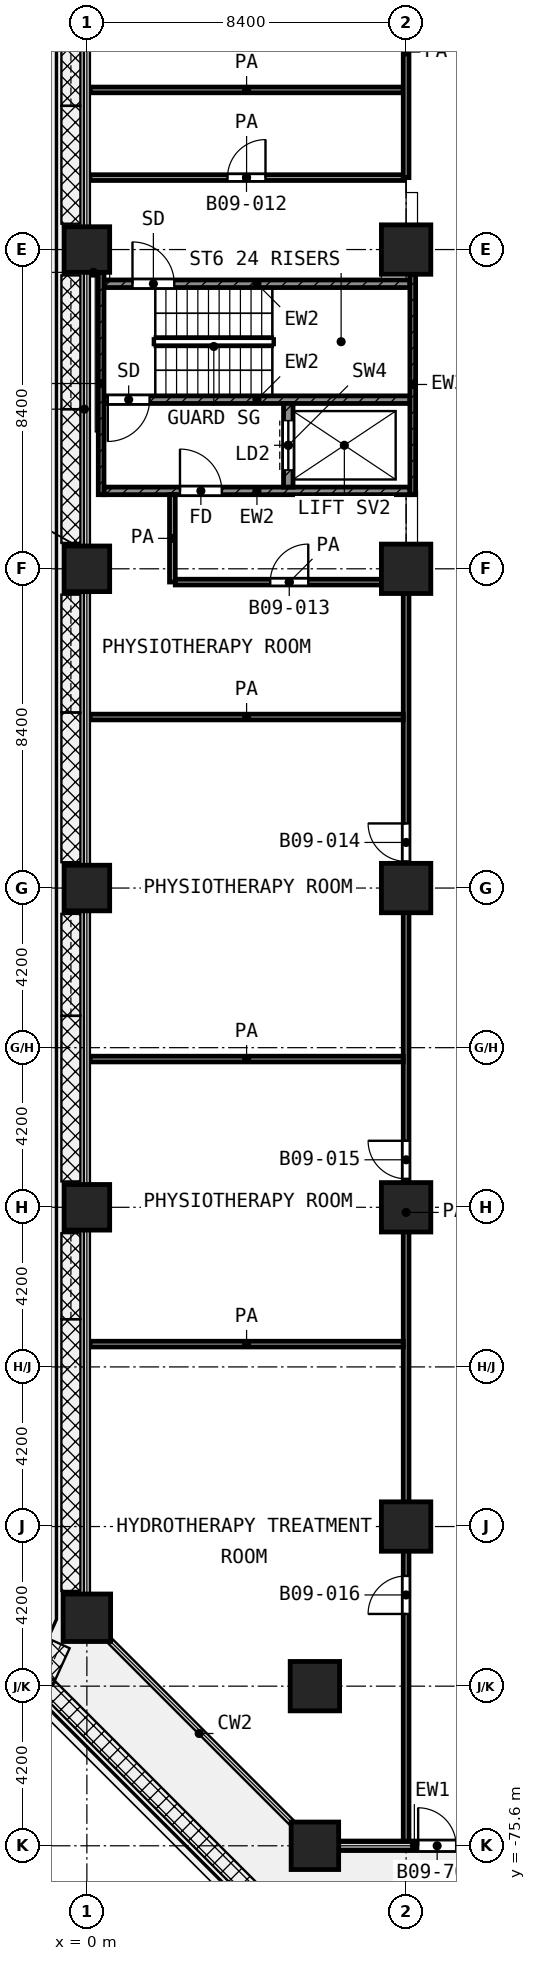
"""IFC4 building model, lengths in metres.
Left out: names, types, materials, properties, quantities, classifications, styles, units other than length and angle.
Written with IfcOpenShell. Run it as: python <this file> out.ifc"""

import sys

from ifc_helpers import new_model, si_unit, direction, frame, frame_2d, origin, origin_2d, place, context, subcontext, project, spatial, rectangle, extrude, element, fill, save


model = new_model("IFC4")
c1 = context("Model", 3, precision=1e-05, world=origin(), true_north=direction((0.0, 1.0)))
c2 = subcontext(c1, "Body", "Model", "MODEL_VIEW")
j1 = project(units=[si_unit("LENGTHUNIT", "METRE"), si_unit("PLANEANGLEUNIT", "RADIAN")], contexts=[c1])
p1 = place(None, origin())
s1 = spatial("IfcSite", under=j1, at=p1, CompositionType="ELEMENT")
p2 = place(p1, origin())
s2 = spatial("IfcBuilding", under=s1, at=p2, CompositionType="ELEMENT")
p3 = place(p2, frame((0.0, 0.0, 43.4)))
s3 = spatial("IfcBuildingStorey", under=s2, at=p3, CompositionType="ELEMENT", Elevation=43.4)
p4 = place(p3, frame((0.0, -33.6, 0.0), z_axis=(0.0, 0.0, 1.0), x_axis=(1.0, 0.0, 0.0)))
e1 = element("IfcColumn", 1, at=p4, inside=s3, PredefinedType="COLUMN", context=c2, shape_type="SweptSolid", body=[
    extrude(rectangle(XDim=1.2, YDim=1.2, at=origin_2d()), origin(), (0.0, 0.0, 1.0), 4.2),
])
p5 = place(p3, frame((8.4, -33.6, 0.0), z_axis=(0.0, 0.0, 1.0), x_axis=(1.0, 0.0, 0.0)))
e2 = element("IfcColumn", 2, at=p5, inside=s3, PredefinedType="COLUMN", context=c2, shape_type="SweptSolid", body=[
    extrude(rectangle(XDim=1.3, YDim=1.3, at=origin_2d()), origin(), (0.0, 0.0, 1.0), 4.2),
])
p6 = place(p3, frame((0.0, -42.0, 0.0), z_axis=(0.0, 0.0, 1.0), x_axis=(1.0, 0.0, 0.0)))
e3 = element("IfcColumn", 3, at=p6, inside=s3, PredefinedType="COLUMN", context=c2, shape_type="SweptSolid", body=[
    extrude(rectangle(XDim=1.2, YDim=1.2, at=origin_2d()), origin(), (0.0, 0.0, 1.0), 4.2),
])
p7 = place(p3, frame((8.4, -42.0, 0.0), z_axis=(0.0, 0.0, 1.0), x_axis=(1.0, 0.0, 0.0)))
e4 = element("IfcColumn", 4, at=p7, inside=s3, PredefinedType="COLUMN", context=c2, shape_type="SweptSolid", body=[
    extrude(rectangle(XDim=1.3, YDim=1.3, at=origin_2d()), origin(), (0.0, 0.0, 1.0), 4.2),
])
p8 = place(p3, frame((0.0, -50.4, 0.0), z_axis=(0.0, 0.0, 1.0), x_axis=(1.0, 0.0, 0.0)))
e5 = element("IfcColumn", 5, at=p8, inside=s3, PredefinedType="COLUMN", context=c2, shape_type="SweptSolid", body=[
    extrude(rectangle(XDim=1.2, YDim=1.2, at=origin_2d()), origin(), (0.0, 0.0, 1.0), 4.2),
])
p9 = place(p3, frame((8.4, -50.4, 0.0), z_axis=(0.0, 0.0, 1.0), x_axis=(1.0, 0.0, 0.0)))
e6 = element("IfcColumn", 6, at=p9, inside=s3, PredefinedType="COLUMN", context=c2, shape_type="SweptSolid", body=[
    extrude(rectangle(XDim=1.3, YDim=1.3, at=origin_2d()), origin(), (0.0, 0.0, 1.0), 4.2),
])
p10 = place(p3, frame((0.0, -58.8, 0.0), z_axis=(0.0, 0.0, 1.0), x_axis=(1.0, 0.0, 0.0)))
e7 = element("IfcColumn", 7, at=p10, inside=s3, PredefinedType="COLUMN", context=c2, shape_type="SweptSolid", body=[
    extrude(rectangle(XDim=1.2, YDim=1.2, at=origin_2d()), origin(), (0.0, 0.0, 1.0), 4.2),
])
for number, where, z_axis, x_axis in (
    (8, (8.4, -58.8, 0.0), (0.0, 0.0, 1.0), (1.0, 0.0, 0.0)),
    (9, (8.4, -67.2, 0.0), (0.0, 0.0, 1.0), (1.0, 0.0, 0.0)),
):
    element("IfcColumn", number, at=place(p3, frame(where, z_axis=z_axis, x_axis=x_axis)), inside=s3, PredefinedType="COLUMN", context=c2, shape_type="SweptSolid", body=[
        extrude(rectangle(XDim=1.3, YDim=1.3, at=origin_2d()), origin(), (0.0, 0.0, 1.0), 4.2),
    ])
p11 = place(p3, frame((0.0, -69.6, 0.0), z_axis=(0.0, 0.0, 1.0), x_axis=(1.0, 0.0, 0.0)))
e10 = element("IfcColumn", 10, at=p11, inside=s3, PredefinedType="COLUMN", context=c2, shape_type="SweptSolid", body=[
    extrude(rectangle(XDim=1.25, YDim=1.25, at=origin_2d()), origin(), (0.0, 0.0, 1.0), 4.2),
])
p12 = place(p3, frame((6.0, -71.4, 0.0), z_axis=(0.0, 0.0, 1.0), x_axis=(1.0, 0.0, 0.0)))
e11 = element("IfcColumn", 11, at=p12, inside=s3, PredefinedType="COLUMN", context=c2, shape_type="SweptSolid", body=[
    extrude(rectangle(XDim=1.3, YDim=1.3, at=origin_2d()), origin(), (0.0, 0.0, 1.0), 4.2),
])
p13 = place(p3, frame((6.0, -75.6, 0.0), z_axis=(0.0, 0.0, 1.0), x_axis=(1.0, 0.0, 0.0)))
e12 = element("IfcColumn", 12, at=p13, inside=s3, PredefinedType="COLUMN", context=c2, shape_type="SweptSolid", body=[
    extrude(rectangle(XDim=1.25, YDim=1.25, at=origin_2d()), origin(), (0.0, 0.0, 1.0), 4.2),
])
p14 = place(p3, frame((6.625, -75.6, 0.0), z_axis=(0.0, 0.0, 1.0), x_axis=(1.0, 0.0, 0.0)))
e13 = element("IfcWall", 13, at=p14, inside=s3, PredefinedType="SOLIDWALL", context=c2, shape_type="SweptSolid", body=[
    extrude(rectangle(XDim=3.983, YDim=0.25, at=frame_2d((1.992, 0.0))), origin(), (0.0, 0.0, 1.0), 3.78),
])
p15 = place(p14, frame((2.092, 0.0, 0.0)))
e14 = element("IfcOpeningElement", 14, at=p15, cuts=e13, PredefinedType="OPENING", context=c2, shape_type="SweptSolid", body=[
    extrude(rectangle(XDim=1.0, YDim=2.1, at=frame_2d((0.5, 1.05))), frame((0.0, 0.135, 0.0), z_axis=(0.0, -1.0, 0.0), x_axis=(1.0, 0.0, 0.0)), (0.0, 0.0, 1.0), 0.27),
])
p16 = place(p3, frame((0.375, -40.05, 0.0), z_axis=(0.0, 0.0, 1.0), x_axis=(0.0, 1.0, 0.0)))
e15 = element("IfcWall", 15, at=p16, inside=s3, PredefinedType="SHEAR", context=c2, shape_type="SweptSolid", body=[
    extrude(rectangle(XDim=5.85, YDim=0.15, at=frame_2d((2.925, 0.0))), origin(), (0.0, 0.0, 1.0), 3.9),
])
p17 = place(p3, frame((8.575, -40.05, 0.0), z_axis=(0.0, 0.0, 1.0), x_axis=(0.0, 1.0, 0.0)))
e16 = element("IfcWall", 16, at=p17, inside=s3, PredefinedType="SHEAR", context=c2, shape_type="SweptSolid", body=[
    extrude(rectangle(XDim=5.8, YDim=0.15, at=frame_2d((2.9, 0.0))), origin(), (0.0, 0.0, 1.0), 3.9),
])
p18 = place(p3, frame((0.45, -34.5, 0.0), z_axis=(0.0, 0.0, 1.0), x_axis=(1.0, 0.0, 0.0)))
e17 = element("IfcWall", 17, at=p18, inside=s3, PredefinedType="SHEAR", context=c2, shape_type="SweptSolid", body=[
    extrude(rectangle(XDim=8.05, YDim=0.2, at=frame_2d((4.025, 0.0))), origin(), (0.0, 0.0, 1.0), 3.9),
])
p19 = place(p18, frame((0.75, 0.0, 0.0)))
e18 = element("IfcOpeningElement", 18, at=p19, cuts=e17, PredefinedType="OPENING", context=c2, shape_type="SweptSolid", body=[
    extrude(rectangle(XDim=1.1, YDim=2.1, at=frame_2d((0.55, 1.05))), frame((0.0, 0.11, 0.0), z_axis=(0.0, -1.0, 0.0), x_axis=(1.0, 0.0, 0.0)), (0.0, 0.0, 1.0), 0.22),
])
p20 = place(p3, frame((0.45, -37.55, 0.0), z_axis=(0.0, 0.0, 1.0), x_axis=(1.0, 0.0, 0.0)))
e19 = element("IfcWall", 19, at=p20, inside=s3, PredefinedType="SHEAR", context=c2, shape_type="SweptSolid", body=[
    extrude(rectangle(XDim=8.05, YDim=0.2, at=frame_2d((4.025, 0.0))), origin(), (0.0, 0.0, 1.0), 3.9),
])
p21 = place(p20, frame((0.1, 0.0, 0.0)))
e20 = element("IfcOpeningElement", 20, at=p21, cuts=e19, PredefinedType="OPENING", context=c2, shape_type="SweptSolid", body=[
    extrude(rectangle(XDim=1.1, YDim=2.1, at=frame_2d((0.55, 1.05))), frame((0.0, 0.11, 0.0), z_axis=(0.0, -1.0, 0.0), x_axis=(1.0, 0.0, 0.0)), (0.0, 0.0, 1.0), 0.22),
])
p22 = place(p3, frame((0.45, -39.95, 0.0), z_axis=(0.0, 0.0, 1.0), x_axis=(1.0, 0.0, 0.0)))
e21 = element("IfcWall", 21, at=p22, inside=s3, PredefinedType="SHEAR", context=c2, shape_type="SweptSolid", body=[
    extrude(rectangle(XDim=8.05, YDim=0.2, at=frame_2d((4.025, 0.0))), origin(), (0.0, 0.0, 1.0), 3.9),
])
p23 = place(p22, frame((2.0, 0.0, 0.0)))
e22 = element("IfcOpeningElement", 22, at=p23, cuts=e21, PredefinedType="OPENING", context=c2, shape_type="SweptSolid", body=[
    extrude(rectangle(XDim=1.1, YDim=2.1, at=frame_2d((0.55, 1.05))), frame((0.0, 0.11, 0.0), z_axis=(0.0, -1.0, 0.0), x_axis=(1.0, 0.0, 0.0)), (0.0, 0.0, 1.0), 0.22),
])
p24 = place(p3, frame((5.3, -39.85, 0.0), z_axis=(0.0, 0.0, 1.0), x_axis=(0.0, 1.0, 0.0)))
e23 = element("IfcWall", 23, at=p24, inside=s3, PredefinedType="SHEAR", context=c2, shape_type="SweptSolid", body=[
    extrude(rectangle(XDim=2.2, YDim=0.25, at=frame_2d((1.1, 0.0))), origin(), (0.0, 0.0, 1.0), 3.9),
])
p25 = place(p24, frame((0.45, 0.0, 0.0)))
e24 = element("IfcOpeningElement", 24, at=p25, cuts=e23, PredefinedType="OPENING", context=c2, shape_type="SweptSolid", body=[
    extrude(rectangle(XDim=1.3, YDim=2.1, at=frame_2d((0.65, 1.05))), frame((0.0, 0.135, 0.0), z_axis=(0.0, -1.0, 0.0), x_axis=(1.0, 0.0, 0.0)), (0.0, 0.0, 1.0), 0.27),
])
for number, where, z_axis, x_axis in (
    (25, (0.08, -62.4, 0.0), (0.0, 0.0, 1.0), (1.0, 0.0, 0.0)),
    (26, (0.08, -54.9, 0.0), (0.0, 0.0, 1.0), (1.0, 0.0, 0.0)),
    (27, (0.08, -45.9, 0.0), (0.0, 0.0, 1.0), (1.0, 0.0, 0.0)),
):
    element("IfcWall", number, at=place(p3, frame(where, z_axis=z_axis, x_axis=x_axis)), inside=s3, PredefinedType="PARTITIONING", context=c2, shape_type="SweptSolid", body=[
        extrude(rectangle(XDim=8.245, YDim=0.15, at=frame_2d((4.123, 0.0))), origin(), (0.0, 0.0, 1.0), 3.9),
    ])
p26 = place(p3, frame((2.326, -42.35, 0.0), z_axis=(0.0, 0.0, 1.0), x_axis=(1.0, 0.0, 0.0)))
e28 = element("IfcWall", 28, at=p26, inside=s3, PredefinedType="PARTITIONING", context=c2, shape_type="SweptSolid", body=[
    extrude(rectangle(XDim=5.999, YDim=0.15, at=frame_2d((3.0, 0.0))), origin(), (0.0, 0.0, 1.0), 3.9),
])
p27 = place(p26, frame((2.499, 0.0, 0.0)))
e29 = element("IfcOpeningElement", 29, at=p27, cuts=e28, PredefinedType="OPENING", context=c2, shape_type="SweptSolid", body=[
    extrude(rectangle(XDim=1.0, YDim=2.1, at=frame_2d((0.5, 1.05))), frame((0.0, 0.085, 0.0), z_axis=(0.0, -1.0, 0.0), x_axis=(1.0, 0.0, 0.0)), (0.0, 0.0, 1.0), 0.17),
])
p28 = place(p3, frame((0.08, -34.2, 0.0), z_axis=(0.0, 0.0, 1.0), x_axis=(1.0, 0.0, 0.0)))
e30 = element("IfcWall", 30, at=p28, inside=s3, PredefinedType="PARTITIONING", context=c2, shape_type="SweptSolid", body=[
    extrude(rectangle(XDim=0.19, YDim=0.15, at=frame_2d((0.095, 0.0))), origin(), (0.0, 0.0, 1.0), 3.9),
])
p29 = place(p3, frame((0.08, -31.707, 0.0), z_axis=(0.0, 0.0, 1.0), x_axis=(1.0, 0.0, 0.0)))
e31 = element("IfcWall", 31, at=p29, inside=s3, PredefinedType="PARTITIONING", context=c2, shape_type="SweptSolid", body=[
    extrude(rectangle(XDim=8.245, YDim=0.15, at=frame_2d((4.123, 0.0))), origin(), (0.0, 0.0, 1.0), 3.9),
])
p30 = place(p29, frame((3.62, 0.0, 0.0)))
e32 = element("IfcOpeningElement", 32, at=p30, cuts=e31, PredefinedType="OPENING", context=c2, shape_type="SweptSolid", body=[
    extrude(rectangle(XDim=1.0, YDim=2.1, at=frame_2d((0.5, 1.05))), frame((0.0, 0.085, 0.0), z_axis=(0.0, -1.0, 0.0), x_axis=(1.0, 0.0, 0.0)), (0.0, 0.0, 1.0), 0.17),
])
p31 = place(p3, frame((0.08, -29.4, 0.0), z_axis=(0.0, 0.0, 1.0), x_axis=(1.0, 0.0, 0.0)))
e33 = element("IfcWall", 33, at=p31, inside=s3, PredefinedType="PARTITIONING", context=c2, shape_type="SweptSolid", body=[
    extrude(rectangle(XDim=8.245, YDim=0.15, at=frame_2d((4.123, 0.0))), origin(), (0.0, 0.0, 1.0), 3.9),
])
p32 = place(p3, frame((2.25, -42.348, 0.0), z_axis=(0.0, 0.0, 1.0), x_axis=(0.0, 1.0, 0.0)))
e34 = element("IfcWall", 34, at=p32, inside=s3, PredefinedType="PARTITIONING", context=c2, shape_type="SweptSolid", body=[
    extrude(rectangle(XDim=2.298, YDim=0.15, at=frame_2d((1.149, 0.0))), origin(), (0.0, 0.0, 1.0), 3.9),
])
p33 = place(p3, frame((8.4, -75.52, 0.0), z_axis=(0.0, 0.0, 1.0), x_axis=(0.0, 1.0, 0.0)))
e35 = element("IfcWall", 35, at=p33, inside=s3, PredefinedType="PARTITIONING", context=c2, shape_type="SweptSolid", body=[
    extrude(rectangle(XDim=33.17, YDim=0.15, at=frame_2d((16.585, 0.0))), origin(), (0.0, 0.0, 1.0), 3.9),
])
p34 = place(p33, frame((25.82, 0.0, 0.0)))
e36 = element("IfcOpeningElement", 36, at=p34, cuts=e35, PredefinedType="OPENING", context=c2, shape_type="SweptSolid", body=[
    extrude(rectangle(XDim=1.0, YDim=2.1, at=frame_2d((0.5, 1.05))), frame((0.0, 0.085, 0.0), z_axis=(0.0, -1.0, 0.0), x_axis=(1.0, 0.0, 0.0)), (0.0, 0.0, 1.0), 0.17),
])
p35 = place(p33, frame((17.47, 0.0, 0.0)))
e37 = element("IfcOpeningElement", 37, at=p35, cuts=e35, PredefinedType="OPENING", context=c2, shape_type="SweptSolid", body=[
    extrude(rectangle(XDim=1.0, YDim=2.1, at=frame_2d((0.5, 1.05))), frame((0.0, 0.085, 0.0), z_axis=(0.0, -1.0, 0.0), x_axis=(1.0, 0.0, 0.0)), (0.0, 0.0, 1.0), 0.17),
])
p36 = place(p33, frame((6.02, 0.0, 0.0)))
e38 = element("IfcOpeningElement", 38, at=p36, cuts=e35, PredefinedType="OPENING", context=c2, shape_type="SweptSolid", body=[
    extrude(rectangle(XDim=1.0, YDim=2.1, at=frame_2d((0.5, 1.05))), frame((0.0, 0.085, 0.0), z_axis=(0.0, -1.0, 0.0), x_axis=(1.0, 0.0, 0.0)), (0.0, 0.0, 1.0), 0.17),
])
p37 = place(p3, frame((8.4, -31.707, 0.0), z_axis=(0.0, 0.0, 1.0), x_axis=(0.0, 1.0, 0.0)))
e39 = element("IfcWall", 39, at=p37, inside=s3, PredefinedType="PARTITIONING", context=c2, shape_type="SweptSolid", body=[
    extrude(rectangle(XDim=6.607, YDim=0.15, at=frame_2d((3.303, 0.0))), origin(), (0.0, 0.0, 1.0), 3.9),
])
p38 = place(p37, frame((3.957, 0.0, 0.0)))
e40 = element("IfcOpeningElement", 40, at=p38, cuts=e39, PredefinedType="OPENING", context=c2, shape_type="SweptSolid", body=[
    extrude(rectangle(XDim=0.9, YDim=2.1, at=frame_2d((0.45, 1.05))), frame((0.0, 0.085, 0.0), z_axis=(0.0, -1.0, 0.0), x_axis=(1.0, 0.0, 0.0)), (0.0, 0.0, 1.0), 0.17),
])
p39 = place(p15, origin())
e41 = element("IfcDoor", 41, at=p39, inside=s3, OperationType="SINGLE_SWING_LEFT", PredefinedType="DOOR", context=c2, shape_type="SweptSolid", body=[
    extrude(rectangle(XDim=1.0, YDim=2.1, at=frame_2d((0.5, 1.05))), frame((0.0, 0.025, 0.0), z_axis=(0.0, -1.0, 0.0), x_axis=(1.0, 0.0, 0.0)), (0.0, 0.0, 1.0), 0.05),
])
fill(e14, e41)
p40 = place(p19, origin())
e42 = element("IfcDoor", 42, at=p40, inside=s3, OperationType="SINGLE_SWING_LEFT", PredefinedType="DOOR", context=c2, shape_type="SweptSolid", body=[
    extrude(rectangle(XDim=1.1, YDim=2.1, at=frame_2d((0.55, 1.05))), frame((0.0, 0.025, 0.0), z_axis=(0.0, -1.0, 0.0), x_axis=(1.0, 0.0, 0.0)), (0.0, 0.0, 1.0), 0.05),
])
fill(e18, e42)
p41 = place(p21, frame((1.1, 0.0, 0.0), z_axis=(0.0, 0.0, 1.0), x_axis=(-1.0, 0.0, 0.0)))
e43 = element("IfcDoor", 43, at=p41, inside=s3, OperationType="SINGLE_SWING_LEFT", PredefinedType="DOOR", context=c2, shape_type="SweptSolid", body=[
    extrude(rectangle(XDim=1.1, YDim=2.1, at=frame_2d((0.55, 1.05))), frame((0.0, 0.025, 0.0), z_axis=(0.0, -1.0, 0.0), x_axis=(1.0, 0.0, 0.0)), (0.0, 0.0, 1.0), 0.05),
])
fill(e20, e43)
p42 = place(p25, origin())
e44 = element("IfcDoor", 44, at=p42, inside=s3, OperationType="DOUBLE_DOOR_SLIDING", PredefinedType="DOOR", context=c2, shape_type="SweptSolid", body=[
    extrude(rectangle(XDim=1.3, YDim=2.1, at=frame_2d((0.65, 1.05))), frame((0.0, 0.025, 0.0), z_axis=(0.0, -1.0, 0.0), x_axis=(1.0, 0.0, 0.0)), (0.0, 0.0, 1.0), 0.05),
])
fill(e24, e44)
p43 = place(p23, origin())
e45 = element("IfcDoor", 45, at=p43, inside=s3, OperationType="SINGLE_SWING_LEFT", PredefinedType="DOOR", context=c2, shape_type="SweptSolid", body=[
    extrude(rectangle(XDim=1.1, YDim=2.1, at=frame_2d((0.55, 1.05))), frame((0.0, 0.025, 0.0), z_axis=(0.0, -1.0, 0.0), x_axis=(1.0, 0.0, 0.0)), (0.0, 0.0, 1.0), 0.05),
])
fill(e22, e45)
p44 = place(p30, origin())
e46 = element("IfcDoor", 46, at=p44, inside=s3, OperationType="SINGLE_SWING_RIGHT", PredefinedType="DOOR", context=c2, shape_type="SweptSolid", body=[
    extrude(rectangle(XDim=1.0, YDim=2.1, at=frame_2d((0.5, 1.05))), frame((0.0, 0.025, 0.0), z_axis=(0.0, -1.0, 0.0), x_axis=(1.0, 0.0, 0.0)), (0.0, 0.0, 1.0), 0.05),
])
fill(e32, e46)
p45 = place(p27, origin())
e47 = element("IfcDoor", 47, at=p45, inside=s3, OperationType="SINGLE_SWING_RIGHT", PredefinedType="DOOR", context=c2, shape_type="SweptSolid", body=[
    extrude(rectangle(XDim=1.0, YDim=2.1, at=frame_2d((0.5, 1.05))), frame((0.0, 0.025, 0.0), z_axis=(0.0, -1.0, 0.0), x_axis=(1.0, 0.0, 0.0)), (0.0, 0.0, 1.0), 0.05),
])
fill(e29, e47)
p46 = place(p34, origin())
e48 = element("IfcDoor", 48, at=p46, inside=s3, OperationType="SINGLE_SWING_RIGHT", PredefinedType="DOOR", context=c2, shape_type="SweptSolid", body=[
    extrude(rectangle(XDim=1.0, YDim=2.1, at=frame_2d((0.5, 1.05))), frame((0.0, 0.025, 0.0), z_axis=(0.0, -1.0, 0.0), x_axis=(1.0, 0.0, 0.0)), (0.0, 0.0, 1.0), 0.05),
])
fill(e36, e48)
p47 = place(p35, origin())
e49 = element("IfcDoor", 49, at=p47, inside=s3, OperationType="SINGLE_SWING_RIGHT", PredefinedType="DOOR", context=c2, shape_type="SweptSolid", body=[
    extrude(rectangle(XDim=1.0, YDim=2.1, at=frame_2d((0.5, 1.05))), frame((0.0, 0.025, 0.0), z_axis=(0.0, -1.0, 0.0), x_axis=(1.0, 0.0, 0.0)), (0.0, 0.0, 1.0), 0.05),
])
fill(e37, e49)
p48 = place(p36, origin())
e50 = element("IfcDoor", 50, at=p48, inside=s3, OperationType="SINGLE_SWING_LEFT", PredefinedType="DOOR", context=c2, shape_type="SweptSolid", body=[
    extrude(rectangle(XDim=1.0, YDim=2.1, at=frame_2d((0.5, 1.05))), frame((0.0, 0.025, 0.0), z_axis=(0.0, -1.0, 0.0), x_axis=(1.0, 0.0, 0.0)), (0.0, 0.0, 1.0), 0.05),
])
fill(e38, e50)
save(model, sys.argv[1])
